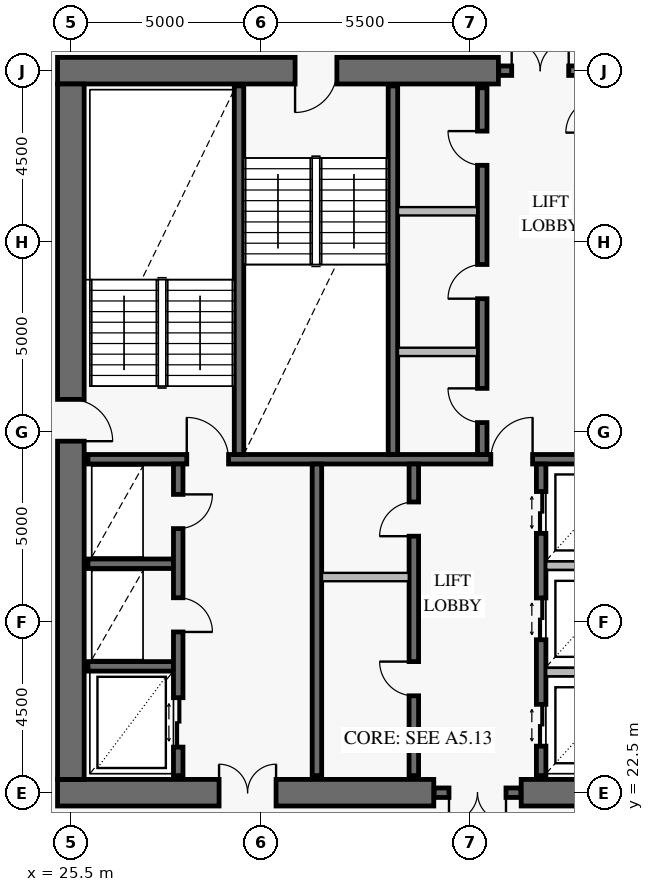
"""IFC4 building model, lengths in metres.
Left out: names, types, materials, properties, quantities, classifications, styles, units other than length and angle.
Written with IfcOpenShell. Run it as: python <this file> out.ifc"""

import sys

from ifc_helpers import new_model, si_unit, direction, frame, frame_2d, origin, place, context, subcontext, project, spatial, rectangle, extrude, element, fill, save


model = new_model("IFC4")
c1 = context("Model", 3, precision=1e-05, world=origin(), true_north=direction((0.0, 1.0)))
c2 = subcontext(c1, "Body", "Model", "MODEL_VIEW")
j1 = project(units=[si_unit("LENGTHUNIT", "METRE"), si_unit("PLANEANGLEUNIT", "RADIAN")], contexts=[c1])
p1 = place(None, origin())
s1 = spatial("IfcSite", under=j1, at=p1, CompositionType="ELEMENT")
p2 = place(p1, origin())
s2 = spatial("IfcBuilding", under=s1, at=p2, CompositionType="ELEMENT")
p3 = place(p2, frame((0.0, 0.0, 161.8)))
s3 = spatial("IfcBuildingStorey", under=s2, at=p3, CompositionType="ELEMENT", Elevation=161.8)
p4 = place(p3, frame((25.15, 22.5, 0.0), z_axis=(0.0, 0.0, 1.0), x_axis=(1.0, 0.0, 0.0)))
e1 = element("IfcWall", 1, at=p4, inside=s3, PredefinedType="SHEAR", context=c2, shape_type="SweptSolid", body=[
    extrude(rectangle(XDim=9.9, YDim=0.7, at=frame_2d((4.95, 0.0))), origin(), (0.0, 0.0, 1.0), 3.8),
])
p5 = place(p4, frame((4.25, 0.0, 0.0)))
e2 = element("IfcOpeningElement", 2, at=p5, cuts=e1, PredefinedType="OPENING", context=c2, shape_type="SweptSolid", body=[
    extrude(rectangle(XDim=1.5, YDim=2.15, at=frame_2d((0.75, 1.075))), frame((0.0, 0.362, 0.0), z_axis=(0.0, -1.0, 0.0), x_axis=(1.0, 0.0, 0.0)), (0.0, 0.0, 1.0), 0.724),
])
p6 = place(p3, frame((37.35, 22.5, 0.0), z_axis=(0.0, 0.0, 1.0), x_axis=(1.0, 0.0, 0.0)))
e3 = element("IfcWall", 3, at=p6, inside=s3, PredefinedType="SHEAR", context=c2, shape_type="SweptSolid", body=[
    extrude(rectangle(XDim=9.5, YDim=0.7, at=frame_2d((4.75, 0.0))), origin(), (0.0, 0.0, 1.0), 3.8),
])
p7 = place(p6, frame((3.95, 0.0, 0.0)))
e4 = element("IfcOpeningElement", 4, at=p7, cuts=e3, PredefinedType="OPENING", context=c2, shape_type="SweptSolid", body=[
    extrude(rectangle(XDim=1.5, YDim=2.15, at=frame_2d((0.75, 1.075))), frame((0.0, 0.362, 0.0), z_axis=(0.0, -1.0, 0.0), x_axis=(1.0, 0.0, 0.0)), (0.0, 0.0, 1.0), 0.724),
])
p8 = place(p3, frame((36.75, 41.5, 0.0), z_axis=(0.0, 0.0, 1.0), x_axis=(-1.0, 0.0, 0.0)))
e5 = element("IfcWall", 5, at=p8, inside=s3, PredefinedType="SHEAR", context=c2, shape_type="SweptSolid", body=[
    extrude(rectangle(XDim=11.6, YDim=0.7, at=frame_2d((5.8, 0.0))), origin(), (0.0, 0.0, 1.0), 3.8),
])
p9 = place(p8, frame((4.25, 0.0, 0.0)))
e6 = element("IfcOpeningElement", 6, at=p9, cuts=e5, PredefinedType="OPENING", context=c2, shape_type="SweptSolid", body=[
    extrude(rectangle(XDim=1.1, YDim=2.15, at=frame_2d((0.55, 1.075))), frame((0.0, 0.362, 0.0), z_axis=(0.0, -1.0, 0.0), x_axis=(1.0, 0.0, 0.0)), (0.0, 0.0, 1.0), 0.724),
])
p10 = place(p3, frame((25.5, 22.85, 0.0), z_axis=(0.0, 0.0, 1.0), x_axis=(0.0, 1.0, 0.0)))
e7 = element("IfcWall", 7, at=p10, inside=s3, PredefinedType="SHEAR", context=c2, shape_type="SweptSolid", body=[
    extrude(rectangle(XDim=18.3, YDim=0.7, at=frame_2d((9.15, 0.0))), origin(), (0.0, 0.0, 1.0), 3.8),
])
p11 = place(p10, frame((8.9, 0.0, 0.0)))
e8 = element("IfcOpeningElement", 8, at=p11, cuts=e7, PredefinedType="OPENING", context=c2, shape_type="SweptSolid", body=[
    extrude(rectangle(XDim=1.1, YDim=2.15, at=frame_2d((0.55, 1.075))), frame((0.0, 0.362, 0.0), z_axis=(0.0, -1.0, 0.0), x_axis=(1.0, 0.0, 0.0)), (0.0, 0.0, 1.0), 0.724),
])
p12 = place(p3, frame((35.06, 22.5, 0.0), z_axis=(0.0, 0.0, 1.0), x_axis=(1.0, 0.0, 0.0)))
e9 = element("IfcWall", 9, at=p12, inside=s3, PredefinedType="SOLIDWALL", context=c2, shape_type="SweptSolid", body=[
    extrude(rectangle(XDim=2.28, YDim=0.25, at=frame_2d((1.14, 0.0))), origin(), (0.0, 0.0, 1.0), 3.8),
])
p13 = place(p12, frame((0.39, 0.0, 0.0)))
e10 = element("IfcOpeningElement", 10, at=p13, cuts=e9, PredefinedType="OPENING", context=c2, shape_type="SweptSolid", body=[
    extrude(rectangle(XDim=1.5, YDim=2.15, at=frame_2d((0.75, 1.075))), frame((0.0, 0.137, 0.0), z_axis=(0.0, -1.0, 0.0), x_axis=(1.0, 0.0, 0.0)), (0.0, 0.0, 1.0), 0.274),
])
p14 = place(p3, frame((36.76, 41.5, 0.0), z_axis=(0.0, 0.0, 1.0), x_axis=(1.0, 0.0, 0.0)))
e11 = element("IfcWall", 11, at=p14, inside=s3, PredefinedType="SOLIDWALL", context=c2, shape_type="SweptSolid", body=[
    extrude(rectangle(XDim=2.18, YDim=0.25, at=frame_2d((1.09, 0.0))), origin(), (0.0, 0.0, 1.0), 3.8),
])
p15 = place(p14, frame((0.34, 0.0, 0.0)))
e12 = element("IfcOpeningElement", 12, at=p15, cuts=e11, PredefinedType="OPENING", context=c2, shape_type="SweptSolid", body=[
    extrude(rectangle(XDim=1.5, YDim=2.15, at=frame_2d((0.75, 1.075))), frame((0.0, 0.137, 0.0), z_axis=(0.0, -1.0, 0.0), x_axis=(1.0, 0.0, 0.0)), (0.0, 0.0, 1.0), 0.274),
])
p16 = place(p3, frame((25.95, 31.275, 0.0), z_axis=(0.0, 0.0, 1.0), x_axis=(1.0, 0.0, 0.0)))
e13 = element("IfcWall", 13, at=p16, inside=s3, PredefinedType="SOLIDWALL", context=c2, shape_type="SweptSolid", body=[
    extrude(rectangle(XDim=20.1, YDim=0.25, at=frame_2d((10.05, 0.0))), origin(), (0.0, 0.0, 1.0), 3.8),
])
p17 = place(p16, frame((2.6, 0.0, 0.0)))
e14 = element("IfcOpeningElement", 14, at=p17, cuts=e13, PredefinedType="OPENING", context=c2, shape_type="SweptSolid", body=[
    extrude(rectangle(XDim=1.1, YDim=2.15, at=frame_2d((0.55, 1.075))), frame((0.0, 0.137, 0.0), z_axis=(0.0, -1.0, 0.0), x_axis=(1.0, 0.0, 0.0)), (0.0, 0.0, 1.0), 0.274),
])
p18 = place(p16, frame((10.6, 0.0, 0.0)))
e15 = element("IfcOpeningElement", 15, at=p18, cuts=e13, PredefinedType="OPENING", context=c2, shape_type="SweptSolid", body=[
    extrude(rectangle(XDim=1.1, YDim=2.15, at=frame_2d((0.55, 1.075))), frame((0.0, 0.137, 0.0), z_axis=(0.0, -1.0, 0.0), x_axis=(1.0, 0.0, 0.0)), (0.0, 0.0, 1.0), 0.274),
])
p19 = place(p16, frame((16.35, 0.0, 0.0)))
e16 = element("IfcOpeningElement", 16, at=p19, cuts=e13, PredefinedType="OPENING", context=c2, shape_type="SweptSolid", body=[
    extrude(rectangle(XDim=1.1, YDim=2.15, at=frame_2d((0.55, 1.075))), frame((0.0, 0.137, 0.0), z_axis=(0.0, -1.0, 0.0), x_axis=(1.0, 0.0, 0.0)), (0.0, 0.0, 1.0), 0.274),
])
for number, where, z_axis, x_axis in (
    (17, (29.925, 31.4, 0.0), (0.0, 0.0, 1.0), (0.0, 1.0, 0.0)),
    (18, (33.975, 31.4, 0.0), (0.0, 0.0, 1.0), (0.0, 1.0, 0.0)),
):
    element("IfcWall", number, at=place(p3, frame(where, z_axis=z_axis, x_axis=x_axis)), inside=s3, PredefinedType="SOLIDWALL", context=c2, shape_type="SweptSolid", body=[
        extrude(rectangle(XDim=9.7, YDim=0.25, at=frame_2d((4.85, 0.0))), origin(), (0.0, 0.0, 1.0), 3.8),
    ])
p20 = place(p3, frame((36.325, 31.4, 0.0), z_axis=(0.0, 0.0, 1.0), x_axis=(0.0, 1.0, 0.0)))
e19 = element("IfcWall", 19, at=p20, inside=s3, PredefinedType="SOLIDWALL", context=c2, shape_type="SweptSolid", body=[
    extrude(rectangle(XDim=9.65, YDim=0.25, at=frame_2d((4.825, 0.0))), origin(), (0.0, 0.0, 1.0), 3.8),
])
p21 = place(p20, frame((0.84, 0.0, 0.0)))
e20 = element("IfcOpeningElement", 20, at=p21, cuts=e19, PredefinedType="OPENING", context=c2, shape_type="SweptSolid", body=[
    extrude(rectangle(XDim=0.9, YDim=2.1, at=frame_2d((0.45, 1.05))), frame((0.0, 0.137, 0.0), z_axis=(0.0, -1.0, 0.0), x_axis=(1.0, 0.0, 0.0)), (0.0, 0.0, 1.0), 0.274),
])
p22 = place(p20, frame((4.1, 0.0, 0.0)))
e21 = element("IfcOpeningElement", 21, at=p22, cuts=e19, PredefinedType="OPENING", context=c2, shape_type="SweptSolid", body=[
    extrude(rectangle(XDim=0.9, YDim=2.1, at=frame_2d((0.45, 1.05))), frame((0.0, 0.137, 0.0), z_axis=(0.0, -1.0, 0.0), x_axis=(1.0, 0.0, 0.0)), (0.0, 0.0, 1.0), 0.274),
])
p23 = place(p20, frame((7.61, 0.0, 0.0)))
e22 = element("IfcOpeningElement", 22, at=p23, cuts=e19, PredefinedType="OPENING", context=c2, shape_type="SweptSolid", body=[
    extrude(rectangle(XDim=0.9, YDim=2.1, at=frame_2d((0.45, 1.05))), frame((0.0, 0.137, 0.0), z_axis=(0.0, -1.0, 0.0), x_axis=(1.0, 0.0, 0.0)), (0.0, 0.0, 1.0), 0.274),
])
for number, where, z_axis, x_axis in (
    (23, (25.95, 25.825, 0.0), (0.0, 0.0, 1.0), (1.0, 0.0, 0.0)),
    (24, (25.95, 28.525, 0.0), (0.0, 0.0, 1.0), (1.0, 0.0, 0.0)),
):
    element("IfcWall", number, at=place(p3, frame(where, z_axis=z_axis, x_axis=x_axis)), inside=s3, PredefinedType="SOLIDWALL", context=c2, shape_type="SweptSolid", body=[
        extrude(rectangle(XDim=2.25, YDim=0.25, at=frame_2d((1.125, 0.0))), origin(), (0.0, 0.0, 1.0), 3.8),
    ])
p24 = place(p3, frame((28.325, 22.95, 0.0), z_axis=(0.0, 0.0, 1.0), x_axis=(0.0, 1.0, 0.0)))
e25 = element("IfcWall", 25, at=p24, inside=s3, PredefinedType="SOLIDWALL", context=c2, shape_type="SweptSolid", body=[
    extrude(rectangle(XDim=8.2, YDim=0.25, at=frame_2d((4.1, 0.0))), origin(), (0.0, 0.0, 1.0), 3.8),
])
p25 = place(p24, frame((0.75, 0.0, 0.0)))
e26 = element("IfcOpeningElement", 26, at=p25, cuts=e25, PredefinedType="OPENING", context=c2, shape_type="SweptSolid", body=[
    extrude(rectangle(XDim=1.3, YDim=2.3, at=frame_2d((0.65, 1.15))), frame((0.0, 0.137, 0.0), z_axis=(0.0, -1.0, 0.0), x_axis=(1.0, 0.0, 0.0)), (0.0, 0.0, 1.0), 0.274),
])
p26 = place(p24, frame((3.78, 0.0, 0.0)))
e27 = element("IfcOpeningElement", 27, at=p26, cuts=e25, PredefinedType="OPENING", context=c2, shape_type="SweptSolid", body=[
    extrude(rectangle(XDim=0.9, YDim=2.1, at=frame_2d((0.45, 1.05))), frame((0.0, 0.137, 0.0), z_axis=(0.0, -1.0, 0.0), x_axis=(1.0, 0.0, 0.0)), (0.0, 0.0, 1.0), 0.274),
])
p27 = place(p24, frame((6.5, 0.0, 0.0)))
e28 = element("IfcOpeningElement", 28, at=p27, cuts=e25, PredefinedType="OPENING", context=c2, shape_type="SweptSolid", body=[
    extrude(rectangle(XDim=0.9, YDim=2.1, at=frame_2d((0.45, 1.05))), frame((0.0, 0.137, 0.0), z_axis=(0.0, -1.0, 0.0), x_axis=(1.0, 0.0, 0.0)), (0.0, 0.0, 1.0), 0.274),
])
p28 = place(p3, frame((31.975, 22.95, 0.0), z_axis=(0.0, 0.0, 1.0), x_axis=(0.0, 1.0, 0.0)))
e29 = element("IfcWall", 29, at=p28, inside=s3, PredefinedType="SOLIDWALL", context=c2, shape_type="SweptSolid", body=[
    extrude(rectangle(XDim=8.2, YDim=0.25, at=frame_2d((4.1, 0.0))), origin(), (0.0, 0.0, 1.0), 3.8),
])
p29 = place(p3, frame((34.525, 22.95, 0.0), z_axis=(0.0, 0.0, 1.0), x_axis=(0.0, 1.0, 0.0)))
e30 = element("IfcWall", 30, at=p29, inside=s3, PredefinedType="SOLIDWALL", context=c2, shape_type="SweptSolid", body=[
    extrude(rectangle(XDim=8.2, YDim=0.25, at=frame_2d((4.1, 0.0))), origin(), (0.0, 0.0, 1.0), 3.8),
])
p30 = place(p29, frame((2.1, 0.0, 0.0)))
e31 = element("IfcOpeningElement", 31, at=p30, cuts=e30, PredefinedType="OPENING", context=c2, shape_type="SweptSolid", body=[
    extrude(rectangle(XDim=0.9, YDim=2.1, at=frame_2d((0.45, 1.05))), frame((0.0, 0.137, 0.0), z_axis=(0.0, -1.0, 0.0), x_axis=(1.0, 0.0, 0.0)), (0.0, 0.0, 1.0), 0.274),
])
p31 = place(p29, frame((6.3, 0.0, 0.0)))
e32 = element("IfcOpeningElement", 32, at=p31, cuts=e30, PredefinedType="OPENING", context=c2, shape_type="SweptSolid", body=[
    extrude(rectangle(XDim=0.9, YDim=2.1, at=frame_2d((0.45, 1.05))), frame((0.0, 0.137, 0.0), z_axis=(0.0, -1.0, 0.0), x_axis=(1.0, 0.0, 0.0)), (0.0, 0.0, 1.0), 0.274),
])
p32 = place(p3, frame((37.875, 22.95, 0.0), z_axis=(0.0, 0.0, 1.0), x_axis=(0.0, 1.0, 0.0)))
e33 = element("IfcWall", 33, at=p32, inside=s3, PredefinedType="SOLIDWALL", context=c2, shape_type="SweptSolid", body=[
    extrude(rectangle(XDim=8.2, YDim=0.25, at=frame_2d((4.1, 0.0))), origin(), (0.0, 0.0, 1.0), 3.8),
])
p33 = place(p32, frame((0.775, 0.0, 0.0)))
e34 = element("IfcOpeningElement", 34, at=p33, cuts=e33, PredefinedType="OPENING", context=c2, shape_type="SweptSolid", body=[
    extrude(rectangle(XDim=1.1, YDim=2.2, at=frame_2d((0.55, 1.1))), frame((0.0, 0.137, 0.0), z_axis=(0.0, -1.0, 0.0), x_axis=(1.0, 0.0, 0.0)), (0.0, 0.0, 1.0), 0.274),
])
p34 = place(p32, frame((3.575, 0.0, 0.0)))
e35 = element("IfcOpeningElement", 35, at=p34, cuts=e33, PredefinedType="OPENING", context=c2, shape_type="SweptSolid", body=[
    extrude(rectangle(XDim=1.1, YDim=2.2, at=frame_2d((0.55, 1.1))), frame((0.0, 0.137, 0.0), z_axis=(0.0, -1.0, 0.0), x_axis=(1.0, 0.0, 0.0)), (0.0, 0.0, 1.0), 0.274),
])
p35 = place(p32, frame((6.375, 0.0, 0.0)))
e36 = element("IfcOpeningElement", 36, at=p35, cuts=e33, PredefinedType="OPENING", context=c2, shape_type="SweptSolid", body=[
    extrude(rectangle(XDim=1.1, YDim=2.2, at=frame_2d((0.55, 1.1))), frame((0.0, 0.137, 0.0), z_axis=(0.0, -1.0, 0.0), x_axis=(1.0, 0.0, 0.0)), (0.0, 0.0, 1.0), 0.274),
])
for number, where, z_axis, x_axis in (
    (37, (34.108, 34.1, 0.0), (0.0, 0.0, 1.0), (1.0, 0.0, 0.0)),
    (38, (34.108, 37.8, 0.0), (0.0, 0.0, 1.0), (1.0, 0.0, 0.0)),
):
    element("IfcWall", number, at=place(p3, frame(where, z_axis=z_axis, x_axis=x_axis)), inside=s3, PredefinedType="PARTITIONING", context=c2, shape_type="SweptSolid", body=[
        extrude(rectangle(XDim=2.084, YDim=0.22, at=frame_2d((1.042, 0.0))), origin(), (0.0, 0.0, 1.0), 3.55),
    ])
p36 = place(p3, frame((32.108, 28.175, 0.0), z_axis=(0.0, 0.0, 1.0), x_axis=(1.0, 0.0, 0.0)))
e39 = element("IfcWall", 39, at=p36, inside=s3, PredefinedType="PARTITIONING", context=c2, shape_type="SweptSolid", body=[
    extrude(rectangle(XDim=2.284, YDim=0.22, at=frame_2d((1.142, 0.0))), origin(), (0.0, 0.0, 1.0), 3.55),
])
for number, where, z_axis, x_axis in (
    (40, (38.008, 25.675, 0.0), (0.0, 0.0, 1.0), (1.0, 0.0, 0.0)),
    (41, (38.008, 28.475, 0.0), (0.0, 0.0, 1.0), (1.0, 0.0, 0.0)),
):
    element("IfcWall", number, at=place(p3, frame(where, z_axis=z_axis, x_axis=x_axis)), inside=s3, PredefinedType="PARTITIONING", context=c2, shape_type="SweptSolid", body=[
        extrude(rectangle(XDim=2.284, YDim=0.22, at=frame_2d((1.142, 0.0))), origin(), (0.0, 0.0, 1.0), 3.55),
    ])
p37 = place(p11, frame((1.1, 0.0, 0.0), z_axis=(0.0, 0.0, 1.0), x_axis=(-1.0, 0.0, 0.0)))
e42 = element("IfcDoor", 42, at=p37, inside=s3, OperationType="SINGLE_SWING_RIGHT", PredefinedType="USERDEFINED", context=c2, shape_type="SweptSolid", body=[
    extrude(rectangle(XDim=1.1, YDim=2.15, at=frame_2d((0.55, 1.075))), frame((0.0, 0.025, 0.0), z_axis=(0.0, -1.0, 0.0), x_axis=(1.0, 0.0, 0.0)), (0.0, 0.0, 1.0), 0.05),
])
fill(e8, e42)
p38 = place(p9, origin())
e43 = element("IfcDoor", 43, at=p38, inside=s3, OperationType="SINGLE_SWING_RIGHT", PredefinedType="USERDEFINED", context=c2, shape_type="SweptSolid", body=[
    extrude(rectangle(XDim=1.1, YDim=2.15, at=frame_2d((0.55, 1.075))), frame((0.0, 0.025, 0.0), z_axis=(0.0, -1.0, 0.0), x_axis=(1.0, 0.0, 0.0)), (0.0, 0.0, 1.0), 0.05),
])
fill(e6, e43)
p39 = place(p5, origin())
e44 = element("IfcDoor", 44, at=p39, inside=s3, OperationType="DOUBLE_DOOR_SINGLE_SWING", PredefinedType="DOOR", context=c2, shape_type="SweptSolid", body=[
    extrude(rectangle(XDim=1.5, YDim=2.15, at=frame_2d((0.75, 1.075))), frame((0.0, 0.025, 0.0), z_axis=(0.0, -1.0, 0.0), x_axis=(1.0, 0.0, 0.0)), (0.0, 0.0, 1.0), 0.05),
])
fill(e2, e44)
p40 = place(p13, frame((1.5, 0.0, 0.0), z_axis=(0.0, 0.0, 1.0), x_axis=(-1.0, 0.0, 0.0)))
e45 = element("IfcDoor", 45, at=p40, inside=s3, OperationType="DOUBLE_DOOR_SINGLE_SWING", PredefinedType="DOOR", context=c2, shape_type="SweptSolid", body=[
    extrude(rectangle(XDim=1.5, YDim=2.15, at=frame_2d((0.75, 1.075))), frame((0.0, 0.025, 0.0), z_axis=(0.0, -1.0, 0.0), x_axis=(1.0, 0.0, 0.0)), (0.0, 0.0, 1.0), 0.05),
])
fill(e10, e45)
p41 = place(p15, origin())
e46 = element("IfcDoor", 46, at=p41, inside=s3, OperationType="DOUBLE_DOOR_SINGLE_SWING", PredefinedType="DOOR", context=c2, shape_type="SweptSolid", body=[
    extrude(rectangle(XDim=1.5, YDim=2.15, at=frame_2d((0.75, 1.075))), frame((0.0, 0.025, 0.0), z_axis=(0.0, -1.0, 0.0), x_axis=(1.0, 0.0, 0.0)), (0.0, 0.0, 1.0), 0.05),
])
fill(e12, e46)
p42 = place(p17, origin())
e47 = element("IfcDoor", 47, at=p42, inside=s3, OperationType="SINGLE_SWING_LEFT", PredefinedType="USERDEFINED", context=c2, shape_type="SweptSolid", body=[
    extrude(rectangle(XDim=1.1, YDim=2.15, at=frame_2d((0.55, 1.075))), frame((0.0, 0.025, 0.0), z_axis=(0.0, -1.0, 0.0), x_axis=(1.0, 0.0, 0.0)), (0.0, 0.0, 1.0), 0.05),
])
fill(e14, e47)
p43 = place(p18, origin())
e48 = element("IfcDoor", 48, at=p43, inside=s3, OperationType="SINGLE_SWING_RIGHT", PredefinedType="USERDEFINED", context=c2, shape_type="SweptSolid", body=[
    extrude(rectangle(XDim=1.1, YDim=2.15, at=frame_2d((0.55, 1.075))), frame((0.0, 0.025, 0.0), z_axis=(0.0, -1.0, 0.0), x_axis=(1.0, 0.0, 0.0)), (0.0, 0.0, 1.0), 0.05),
])
fill(e15, e48)
p44 = place(p21, origin())
e49 = element("IfcDoor", 49, at=p44, inside=s3, OperationType="SINGLE_SWING_RIGHT", PredefinedType="DOOR", context=c2, shape_type="SweptSolid", body=[
    extrude(rectangle(XDim=0.9, YDim=2.1, at=frame_2d((0.45, 1.05))), frame((0.0, 0.025, 0.0), z_axis=(0.0, -1.0, 0.0), x_axis=(1.0, 0.0, 0.0)), (0.0, 0.0, 1.0), 0.05),
])
fill(e20, e49)
p45 = place(p22, origin())
e50 = element("IfcDoor", 50, at=p45, inside=s3, OperationType="SINGLE_SWING_LEFT", PredefinedType="DOOR", context=c2, shape_type="SweptSolid", body=[
    extrude(rectangle(XDim=0.9, YDim=2.1, at=frame_2d((0.45, 1.05))), frame((0.0, 0.025, 0.0), z_axis=(0.0, -1.0, 0.0), x_axis=(1.0, 0.0, 0.0)), (0.0, 0.0, 1.0), 0.05),
])
fill(e21, e50)
p46 = place(p23, origin())
e51 = element("IfcDoor", 51, at=p46, inside=s3, OperationType="SINGLE_SWING_RIGHT", PredefinedType="DOOR", context=c2, shape_type="SweptSolid", body=[
    extrude(rectangle(XDim=0.9, YDim=2.1, at=frame_2d((0.45, 1.05))), frame((0.0, 0.025, 0.0), z_axis=(0.0, -1.0, 0.0), x_axis=(1.0, 0.0, 0.0)), (0.0, 0.0, 1.0), 0.05),
])
fill(e22, e51)
p47 = place(p25, frame((1.3, 0.0, 0.0), z_axis=(0.0, 0.0, 1.0), x_axis=(-1.0, 0.0, 0.0)))
e52 = element("IfcDoor", 52, at=p47, inside=s3, OperationType="DOUBLE_DOOR_SLIDING", PredefinedType="DOOR", context=c2, shape_type="SweptSolid", body=[
    extrude(rectangle(XDim=1.3, YDim=2.3, at=frame_2d((0.65, 1.15))), frame((0.0, 0.025, 0.0), z_axis=(0.0, -1.0, 0.0), x_axis=(1.0, 0.0, 0.0)), (0.0, 0.0, 1.0), 0.05),
])
fill(e26, e52)
p48 = place(p26, frame((0.9, 0.0, 0.0), z_axis=(0.0, 0.0, 1.0), x_axis=(-1.0, 0.0, 0.0)))
e53 = element("IfcDoor", 53, at=p48, inside=s3, OperationType="SINGLE_SWING_RIGHT", PredefinedType="DOOR", context=c2, shape_type="SweptSolid", body=[
    extrude(rectangle(XDim=0.9, YDim=2.1, at=frame_2d((0.45, 1.05))), frame((0.0, 0.025, 0.0), z_axis=(0.0, -1.0, 0.0), x_axis=(1.0, 0.0, 0.0)), (0.0, 0.0, 1.0), 0.05),
])
fill(e27, e53)
p49 = place(p27, frame((0.9, 0.0, 0.0), z_axis=(0.0, 0.0, 1.0), x_axis=(-1.0, 0.0, 0.0)))
e54 = element("IfcDoor", 54, at=p49, inside=s3, OperationType="SINGLE_SWING_LEFT", PredefinedType="DOOR", context=c2, shape_type="SweptSolid", body=[
    extrude(rectangle(XDim=0.9, YDim=2.1, at=frame_2d((0.45, 1.05))), frame((0.0, 0.025, 0.0), z_axis=(0.0, -1.0, 0.0), x_axis=(1.0, 0.0, 0.0)), (0.0, 0.0, 1.0), 0.05),
])
fill(e28, e54)
p50 = place(p30, origin())
e55 = element("IfcDoor", 55, at=p50, inside=s3, OperationType="SINGLE_SWING_RIGHT", PredefinedType="DOOR", context=c2, shape_type="SweptSolid", body=[
    extrude(rectangle(XDim=0.9, YDim=2.1, at=frame_2d((0.45, 1.05))), frame((0.0, 0.025, 0.0), z_axis=(0.0, -1.0, 0.0), x_axis=(1.0, 0.0, 0.0)), (0.0, 0.0, 1.0), 0.05),
])
fill(e31, e55)
p51 = place(p31, origin())
e56 = element("IfcDoor", 56, at=p51, inside=s3, OperationType="SINGLE_SWING_LEFT", PredefinedType="DOOR", context=c2, shape_type="SweptSolid", body=[
    extrude(rectangle(XDim=0.9, YDim=2.1, at=frame_2d((0.45, 1.05))), frame((0.0, 0.025, 0.0), z_axis=(0.0, -1.0, 0.0), x_axis=(1.0, 0.0, 0.0)), (0.0, 0.0, 1.0), 0.05),
])
fill(e32, e56)
p52 = place(p33, origin())
e57 = element("IfcDoor", 57, at=p52, inside=s3, OperationType="DOUBLE_DOOR_SLIDING", PredefinedType="DOOR", context=c2, shape_type="SweptSolid", body=[
    extrude(rectangle(XDim=1.1, YDim=2.2, at=frame_2d((0.55, 1.1))), frame((0.0, 0.025, 0.0), z_axis=(0.0, -1.0, 0.0), x_axis=(1.0, 0.0, 0.0)), (0.0, 0.0, 1.0), 0.05),
])
fill(e34, e57)
p53 = place(p34, origin())
e58 = element("IfcDoor", 58, at=p53, inside=s3, OperationType="DOUBLE_DOOR_SLIDING", PredefinedType="DOOR", context=c2, shape_type="SweptSolid", body=[
    extrude(rectangle(XDim=1.1, YDim=2.2, at=frame_2d((0.55, 1.1))), frame((0.0, 0.025, 0.0), z_axis=(0.0, -1.0, 0.0), x_axis=(1.0, 0.0, 0.0)), (0.0, 0.0, 1.0), 0.05),
])
fill(e35, e58)
p54 = place(p35, origin())
e59 = element("IfcDoor", 59, at=p54, inside=s3, OperationType="DOUBLE_DOOR_SLIDING", PredefinedType="DOOR", context=c2, shape_type="SweptSolid", body=[
    extrude(rectangle(XDim=1.1, YDim=2.2, at=frame_2d((0.55, 1.1))), frame((0.0, 0.025, 0.0), z_axis=(0.0, -1.0, 0.0), x_axis=(1.0, 0.0, 0.0)), (0.0, 0.0, 1.0), 0.05),
])
fill(e36, e59)
save(model, sys.argv[1])
